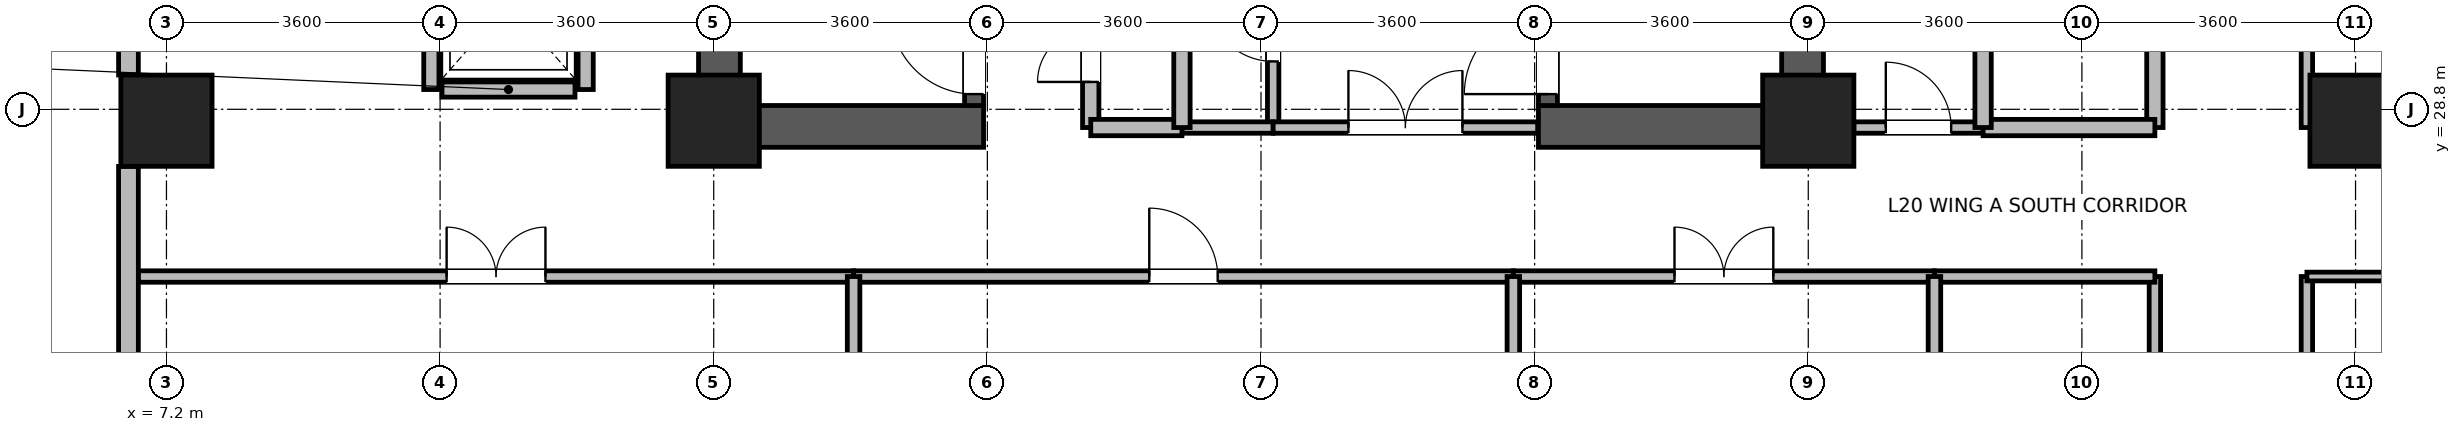
"""IFC4 building model, lengths in metres.
Left out: names, types, materials, properties, quantities, classifications, styles, units other than length and angle.
Written with IfcOpenShell. Run it as: python <this file> out.ifc"""

import sys

from ifc_helpers import new_model, si_unit, direction, frame, frame_2d, origin, origin_2d, place, context, subcontext, project, spatial, rectangle, extrude, source, transform, mapped, element, fill, save


model = new_model("IFC4")
c1 = context("Model", 3, precision=1e-05, world=origin(), true_north=direction((0.0, 1.0)))
c2 = subcontext(c1, "Body", "Model", "MODEL_VIEW")
j1 = project(units=[si_unit("LENGTHUNIT", "METRE"), si_unit("PLANEANGLEUNIT", "RADIAN")], contexts=[c1])
p1 = place(None, origin())
s1 = spatial("IfcSite", under=j1, at=p1, CompositionType="ELEMENT")
p2 = place(p1, origin())
s2 = spatial("IfcBuilding", under=s1, at=p2, CompositionType="ELEMENT")
p3 = place(p2, frame((0.0, 0.0, 82.3)))
s3 = spatial("IfcBuildingStorey", under=s2, at=p3, CompositionType="ELEMENT", Elevation=82.3)
for number, where, z_axis, x_axis in (
    (1, (14.475, 28.3, 0.0), (0.0, 0.0, 1.0), (0.0, 1.0, 0.0)),
    (2, (28.725, 28.3, 0.0), (0.0, 0.0, 1.0), (0.0, 1.0, 0.0)),
):
    element("IfcWall", number, at=place(p3, frame(where, z_axis=z_axis, x_axis=x_axis)), inside=s3, PredefinedType="SHEAR", context=c2, shape_type="SweptSolid", body=[
        extrude(rectangle(XDim=8.1, YDim=0.55, at=frame_2d((4.05, 0.0))), origin(), (0.0, 0.0, 1.0), 3.45),
    ])
for number, where, z_axis, x_axis in (
    (3, (14.75, 28.575, 0.0), (0.0, 0.0, 1.0), (1.0, 0.0, 0.0)),
    (4, (25.25, 28.575, 0.0), (0.0, 0.0, 1.0), (1.0, 0.0, 0.0)),
):
    element("IfcWall", number, at=place(p3, frame(where, z_axis=z_axis, x_axis=x_axis)), inside=s3, PredefinedType="SHEAR", context=c2, shape_type="SweptSolid", body=[
        extrude(rectangle(XDim=3.2, YDim=0.55, at=frame_2d((1.6, 0.0))), origin(), (0.0, 0.0, 1.0), 3.45),
    ])
p4 = place(p3, frame((17.825, 28.85, 0.0), z_axis=(0.0, 0.0, 1.0), x_axis=(0.0, 1.0, 0.0)))
e5 = element("IfcWall", 5, at=p4, inside=s3, PredefinedType="SHEAR", context=c2, shape_type="SweptSolid", body=[
    extrude(rectangle(XDim=7.0, YDim=0.25, at=frame_2d((3.5, 0.0))), origin(), (0.0, 0.0, 1.0), 3.45),
])
p5 = place(p4, frame((0.15, 0.0, 0.0)))
e6 = element("IfcOpeningElement", 6, at=p5, cuts=e5, PredefinedType="OPENING", context=c2, shape_type="SweptSolid", body=[
    extrude(rectangle(XDim=1.1, YDim=2.08, at=frame_2d((0.55, 1.04))), frame((0.0, 0.135, 0.0), z_axis=(0.0, -1.0, 0.0), x_axis=(1.0, 0.0, 0.0)), (0.0, 0.0, 1.0), 0.27),
])
p6 = place(p3, frame((25.375, 28.85, 0.0), z_axis=(0.0, 0.0, 1.0), x_axis=(0.0, 1.0, 0.0)))
e7 = element("IfcWall", 7, at=p6, inside=s3, PredefinedType="SHEAR", context=c2, shape_type="SweptSolid", body=[
    extrude(rectangle(XDim=7.0, YDim=0.25, at=frame_2d((3.5, 0.0))), origin(), (0.0, 0.0, 1.0), 3.45),
])
p7 = place(p6, frame((0.15, 0.0, 0.0)))
e8 = element("IfcOpeningElement", 8, at=p7, cuts=e7, PredefinedType="OPENING", context=c2, shape_type="SweptSolid", body=[
    extrude(rectangle(XDim=1.1, YDim=2.08, at=frame_2d((0.55, 1.04))), frame((0.0, 0.135, 0.0), z_axis=(0.0, -1.0, 0.0), x_axis=(1.0, 0.0, 0.0)), (0.0, 0.0, 1.0), 0.27),
])
m1 = source(origin(), c2, "Body", "SweptSolid", [
    extrude(rectangle(XDim=1.2, YDim=1.2, at=origin_2d()), origin(), (0.0, 0.0, 1.0), 3.7),
])
for number, where, z_axis, x_axis in (
    (9, (7.2, 28.65, 0.0), (0.0, 0.0, 1.0), (1.0, 0.0, 0.0)),
    (10, (14.4, 28.65, 0.0), (0.0, 0.0, 1.0), (1.0, 0.0, 0.0)),
    (11, (28.8, 28.65, 0.0), (0.0, 0.0, 1.0), (1.0, 0.0, 0.0)),
    (12, (36.0, 28.65, 0.0), (0.0, 0.0, 1.0), (1.0, 0.0, 0.0)),
):
    element("IfcColumn", number, at=place(p3, frame(where, z_axis=z_axis, x_axis=x_axis)), inside=s3, PredefinedType="COLUMN", context=c2, shape_type="MappedRepresentation", body=[
        mapped(m1, transform((0.0, 0.0, 0.0), x_axis=(1.0, 0.0, 0.0), y_axis=(0.0, 1.0, 0.0), z_axis=(0.0, 0.0, 1.0), scale=1.0)),
    ])
p8 = place(p3, frame((6.7, 29.251, 0.0), z_axis=(0.0, 0.0, 1.0), x_axis=(0.0, 1.0, 0.0)))
e13 = element("IfcWall", 13, at=p8, inside=s3, PredefinedType="STANDARD", context=c2, shape_type="SweptSolid", body=[
    extrude(rectangle(XDim=6.298, YDim=0.26, at=frame_2d((3.149, 0.0))), origin(), (0.0, 0.0, 1.0), 3.43),
])
p9 = place(p8, frame((2.674, 0.0, 0.85)))
e14 = element("IfcOpeningElement", 14, at=p9, cuts=e13, PredefinedType="OPENING", context=c2, shape_type="SweptSolid", body=[
    extrude(rectangle(XDim=0.95, YDim=1.75, at=frame_2d((0.475, 0.875))), frame((0.0, 0.14, 0.0), z_axis=(0.0, -1.0, 0.0), x_axis=(1.0, 0.0, 0.0)), (0.0, 0.0, 1.0), 0.28),
])
p10 = place(p8, frame((1.112, 0.0, 0.85)))
e15 = element("IfcOpeningElement", 15, at=p10, cuts=e13, PredefinedType="OPENING", context=c2, shape_type="SweptSolid", body=[
    extrude(rectangle(XDim=0.95, YDim=1.75, at=frame_2d((0.475, 0.875))), frame((0.0, 0.14, 0.0), z_axis=(0.0, -1.0, 0.0), x_axis=(1.0, 0.0, 0.0)), (0.0, 0.0, 1.0), 0.28),
])
p11 = place(p3, frame((6.7, 21.47, 0.0), z_axis=(0.0, 0.0, 1.0), x_axis=(0.0, 1.0, 0.0)))
e16 = element("IfcWall", 16, at=p11, inside=s3, PredefinedType="STANDARD", context=c2, shape_type="SweptSolid", body=[
    extrude(rectangle(XDim=6.579, YDim=0.26, at=frame_2d((3.29, 0.0))), origin(), (0.0, 0.0, 1.0), 3.43),
])
p12 = place(p11, frame((2.814, 0.0, 0.85)))
e17 = element("IfcOpeningElement", 17, at=p12, cuts=e16, PredefinedType="OPENING", context=c2, shape_type="SweptSolid", body=[
    extrude(rectangle(XDim=0.95, YDim=1.75, at=frame_2d((0.475, 0.875))), frame((0.0, 0.14, 0.0), z_axis=(0.0, -1.0, 0.0), x_axis=(1.0, 0.0, 0.0)), (0.0, 0.0, 1.0), 0.28),
])
p13 = place(p11, frame((1.183, 0.0, 0.85)))
e18 = element("IfcOpeningElement", 18, at=p13, cuts=e16, PredefinedType="OPENING", context=c2, shape_type="SweptSolid", body=[
    extrude(rectangle(XDim=0.95, YDim=1.75, at=frame_2d((0.475, 0.875))), frame((0.0, 0.14, 0.0), z_axis=(0.0, -1.0, 0.0), x_axis=(1.0, 0.0, 0.0)), (0.0, 0.0, 1.0), 0.28),
])
p14 = place(p3, frame((10.825, 29.06, 0.0), z_axis=(0.0, 0.0, 1.0), x_axis=(1.0, 0.0, 0.0)))
e19 = element("IfcWall", 19, at=p14, inside=s3, PredefinedType="PARTITIONING", context=c2, shape_type="SweptSolid", body=[
    extrude(rectangle(XDim=1.75, YDim=0.2, at=frame_2d((0.875, 0.0))), origin(), (0.0, 0.0, 1.0), 3.43),
])
for number, where, z_axis, x_axis in (
    (20, (10.685, 29.06, 0.0), (0.0, 0.0, 1.0), (0.0, 1.0, 0.0)),
    (21, (12.715, 29.06, 0.0), (0.0, 0.0, 1.0), (0.0, 1.0, 0.0)),
):
    element("IfcWall", number, at=place(p3, frame(where, z_axis=z_axis, x_axis=x_axis)), inside=s3, PredefinedType="PARTITIONING", context=c2, shape_type="SweptSolid", body=[
        extrude(rectangle(XDim=2.28, YDim=0.2, at=frame_2d((1.14, 0.0))), origin(), (0.0, 0.0, 1.0), 3.43),
    ])
p15 = place(p3, frame((35.36, 16.96, 0.0), z_axis=(0.0, 0.0, 1.0), x_axis=(0.0, 1.0, 0.0)))
e22 = element("IfcWall", 22, at=p15, inside=s3, PredefinedType="PARTITIONING", context=c2, shape_type="SweptSolid", body=[
    extrude(rectangle(XDim=9.64, YDim=0.15, at=frame_2d((4.82, 0.0))), origin(), (0.0, 0.0, 1.0), 3.43),
])
p16 = place(p15, frame((2.435, 0.0, 0.0)))
e23 = element("IfcOpeningElement", 23, at=p16, cuts=e22, PredefinedType="OPENING", context=c2, shape_type="SweptSolid", body=[
    extrude(rectangle(XDim=1.3, YDim=2.12, at=frame_2d((0.65, 1.06))), frame((0.0, 0.085, 0.0), z_axis=(0.0, -1.0, 0.0), x_axis=(1.0, 0.0, 0.0)), (0.0, 0.0, 1.0), 0.17),
])
p17 = place(p3, frame((6.832, 26.6, 0.0), z_axis=(0.0, 0.0, 1.0), x_axis=(1.0, 0.0, 0.0)))
e24 = element("IfcWall", 24, at=p17, inside=s3, PredefinedType="PARTITIONING", context=c2, shape_type="SweptSolid", body=[
    extrude(rectangle(XDim=9.408, YDim=0.15, at=frame_2d((4.704, 0.0))), origin(), (0.0, 0.0, 1.0), 3.43),
])
p18 = place(p17, frame((4.054, 0.0, 0.0)))
e25 = element("IfcOpeningElement", 25, at=p18, cuts=e24, PredefinedType="OPENING", context=c2, shape_type="SweptSolid", body=[
    extrude(rectangle(XDim=1.3, YDim=2.12, at=frame_2d((0.65, 1.06))), frame((0.0, 0.085, 0.0), z_axis=(0.0, -1.0, 0.0), x_axis=(1.0, 0.0, 0.0)), (0.0, 0.0, 1.0), 0.17),
])
p19 = place(p3, frame((16.24, 26.6, 0.0), z_axis=(0.0, 0.0, 1.0), x_axis=(1.0, 0.0, 0.0)))
e26 = element("IfcWall", 26, at=p19, inside=s3, PredefinedType="PARTITIONING", context=c2, shape_type="SweptSolid", body=[
    extrude(rectangle(XDim=8.68, YDim=0.15, at=frame_2d((4.34, 0.0))), origin(), (0.0, 0.0, 1.0), 3.43),
])
p20 = place(p19, frame((3.89, 0.0, 0.0)))
e27 = element("IfcOpeningElement", 27, at=p20, cuts=e26, PredefinedType="OPENING", context=c2, shape_type="SweptSolid", body=[
    extrude(rectangle(XDim=0.9, YDim=2.08, at=frame_2d((0.45, 1.04))), frame((0.0, 0.085, 0.0), z_axis=(0.0, -1.0, 0.0), x_axis=(1.0, 0.0, 0.0)), (0.0, 0.0, 1.0), 0.17),
])
p21 = place(p3, frame((35.36, 28.56, 0.0), z_axis=(0.0, 0.0, 1.0), x_axis=(0.0, 1.0, 0.0)))
e28 = element("IfcWall", 28, at=p21, inside=s3, PredefinedType="PARTITIONING", context=c2, shape_type="SweptSolid", body=[
    extrude(rectangle(XDim=7.68, YDim=0.15, at=frame_2d((3.84, 0.0))), origin(), (0.0, 0.0, 1.0), 3.43),
])
p22 = place(p21, frame((3.19, 0.0, 0.0)))
e29 = element("IfcOpeningElement", 29, at=p22, cuts=e28, PredefinedType="OPENING", context=c2, shape_type="SweptSolid", body=[
    extrude(rectangle(XDim=1.3, YDim=2.12, at=frame_2d((0.65, 1.06))), frame((0.0, 0.085, 0.0), z_axis=(0.0, -1.0, 0.0), x_axis=(1.0, 0.0, 0.0)), (0.0, 0.0, 1.0), 0.17),
])
p23 = place(p3, frame((24.92, 26.6, 0.0), z_axis=(0.0, 0.0, 1.0), x_axis=(1.0, 0.0, 0.0)))
e30 = element("IfcWall", 30, at=p23, inside=s3, PredefinedType="PARTITIONING", context=c2, shape_type="SweptSolid", body=[
    extrude(rectangle(XDim=5.54, YDim=0.15, at=frame_2d((2.77, 0.0))), origin(), (0.0, 0.0, 1.0), 3.43),
])
p24 = place(p23, frame((2.12, 0.0, 0.0)))
e31 = element("IfcOpeningElement", 31, at=p24, cuts=e30, PredefinedType="OPENING", context=c2, shape_type="SweptSolid", body=[
    extrude(rectangle(XDim=1.3, YDim=2.12, at=frame_2d((0.65, 1.06))), frame((0.0, 0.085, 0.0), z_axis=(0.0, -1.0, 0.0), x_axis=(1.0, 0.0, 0.0)), (0.0, 0.0, 1.0), 0.17),
])
p25 = place(p3, frame((33.36, 21.6, 0.0), z_axis=(0.0, 0.0, 1.0), x_axis=(0.0, 1.0, 0.0)))
e32 = element("IfcWall", 32, at=p25, inside=s3, PredefinedType="PARTITIONING", context=c2, shape_type="SweptSolid", body=[
    extrude(rectangle(XDim=5.0, YDim=0.15, at=frame_2d((2.5, 0.0))), origin(), (0.0, 0.0, 1.0), 3.43),
])
p26 = place(p25, frame((2.07, 0.0, 0.0)))
e33 = element("IfcOpeningElement", 33, at=p26, cuts=e32, PredefinedType="OPENING", context=c2, shape_type="SweptSolid", body=[
    extrude(rectangle(XDim=0.86, YDim=2.02, at=frame_2d((0.43, 1.01))), frame((0.0, 0.085, 0.0), z_axis=(0.0, -1.0, 0.0), x_axis=(1.0, 0.0, 0.0)), (0.0, 0.0, 1.0), 0.17),
])
p27 = place(p3, frame((33.36, 28.56, 0.0), z_axis=(0.0, 0.0, 1.0), x_axis=(0.0, 1.0, 0.0)))
e34 = element("IfcWall", 34, at=p27, inside=s3, PredefinedType="PARTITIONING", context=c2, shape_type="SweptSolid", body=[
    extrude(rectangle(XDim=3.84, YDim=0.215, at=frame_2d((1.92, 0.0))), origin(), (0.0, 0.0, 1.0), 3.43),
])
p28 = place(p27, frame((1.22, 0.0, 0.0)))
e35 = element("IfcOpeningElement", 35, at=p28, cuts=e34, PredefinedType="OPENING", context=c2, shape_type="SweptSolid", body=[
    extrude(rectangle(XDim=1.4, YDim=2.15, at=frame_2d((0.7, 1.075))), frame((0.0, 0.118, 0.0), z_axis=(0.0, -1.0, 0.0), x_axis=(1.0, 0.0, 0.0)), (0.0, 0.0, 1.0), 0.235),
])
p29 = place(p3, frame((30.46, 26.6, 0.0), z_axis=(0.0, 0.0, 1.0), x_axis=(1.0, 0.0, 0.0)))
e36 = element("IfcWall", 36, at=p29, inside=s3, PredefinedType="PARTITIONING", context=c2, shape_type="SweptSolid", body=[
    extrude(rectangle(XDim=2.9, YDim=0.15, at=frame_2d((1.45, 0.0))), origin(), (0.0, 0.0, 1.0), 3.43),
])
p30 = place(p3, frame((19.36, 28.56, 0.0), z_axis=(0.0, 0.0, 1.0), x_axis=(0.0, 1.0, 0.0)))
e37 = element("IfcWall", 37, at=p30, inside=s3, PredefinedType="PARTITIONING", context=c2, shape_type="SweptSolid", body=[
    extrude(rectangle(XDim=2.6, YDim=0.215, at=frame_2d((1.3, 0.0))), origin(), (0.0, 0.0, 1.0), 3.43),
])
p31 = place(p30, frame((0.6, 0.0, 0.0)))
e38 = element("IfcOpeningElement", 38, at=p31, cuts=e37, PredefinedType="OPENING", context=c2, shape_type="SweptSolid", body=[
    extrude(rectangle(XDim=1.4, YDim=2.15, at=frame_2d((0.7, 1.075))), frame((0.0, 0.118, 0.0), z_axis=(0.0, -1.0, 0.0), x_axis=(1.0, 0.0, 0.0)), (0.0, 0.0, 1.0), 0.235),
])
p32 = place(p3, frame((21.76, 28.56, 0.0), z_axis=(0.0, 0.0, 1.0), x_axis=(0.0, 1.0, 0.0)))
e39 = element("IfcWall", 39, at=p32, inside=s3, PredefinedType="PARTITIONING", context=c2, shape_type="SweptSolid", body=[
    extrude(rectangle(XDim=2.6, YDim=0.15, at=frame_2d((1.3, 0.0))), origin(), (0.0, 0.0, 1.0), 3.43),
])
p33 = place(p32, frame((0.87, 0.0, 0.0)))
e40 = element("IfcOpeningElement", 40, at=p33, cuts=e39, PredefinedType="OPENING", context=c2, shape_type="SweptSolid", body=[
    extrude(rectangle(XDim=0.86, YDim=2.02, at=frame_2d((0.43, 1.01))), frame((0.0, 0.085, 0.0), z_axis=(0.0, -1.0, 0.0), x_axis=(1.0, 0.0, 0.0)), (0.0, 0.0, 1.0), 0.17),
])
p34 = place(p3, frame((29.4, 28.56, 0.0), z_axis=(0.0, 0.0, 1.0), x_axis=(1.0, 0.0, 0.0)))
e41 = element("IfcWall", 41, at=p34, inside=s3, PredefinedType="PARTITIONING", context=c2, shape_type="SweptSolid", body=[
    extrude(rectangle(XDim=1.7, YDim=0.15, at=frame_2d((0.85, 0.0))), origin(), (0.0, 0.0, 1.0), 2.78),
])
p35 = place(p34, frame((0.42, 0.0, 0.0)))
e42 = element("IfcOpeningElement", 42, at=p35, cuts=e41, PredefinedType="OPENING", context=c2, shape_type="SweptSolid", body=[
    extrude(rectangle(XDim=0.86, YDim=2.02, at=frame_2d((0.43, 1.01))), frame((0.0, 0.085, 0.0), z_axis=(0.0, -1.0, 0.0), x_axis=(1.0, 0.0, 0.0)), (0.0, 0.0, 1.0), 0.17),
])
p36 = place(p3, frame((31.1, 28.56, 0.0), z_axis=(0.0, 0.0, 1.0), x_axis=(1.0, 0.0, 0.0)))
e43 = element("IfcWall", 43, at=p36, inside=s3, PredefinedType="PARTITIONING", context=c2, shape_type="SweptSolid", body=[
    extrude(rectangle(XDim=2.26, YDim=0.215, at=frame_2d((1.13, 0.0))), origin(), (0.0, 0.0, 1.0), 2.78),
])
p37 = place(p3, frame((20.56, 28.56, 0.0), z_axis=(0.0, 0.0, 1.0), x_axis=(1.0, 0.0, 0.0)))
e44 = element("IfcWall", 44, at=p37, inside=s3, PredefinedType="PARTITIONING", context=c2, shape_type="SweptSolid", body=[
    extrude(rectangle(XDim=1.2, YDim=0.15, at=frame_2d((0.6, 0.0))), origin(), (0.0, 0.0, 1.0), 2.23),
])
p38 = place(p3, frame((19.36, 28.56, 0.0), z_axis=(0.0, 0.0, 1.0), x_axis=(1.0, 0.0, 0.0)))
e45 = element("IfcWall", 45, at=p38, inside=s3, PredefinedType="PARTITIONING", context=c2, shape_type="SweptSolid", body=[
    extrude(rectangle(XDim=1.2, YDim=0.215, at=frame_2d((0.6, 0.0))), origin(), (0.0, 0.0, 1.0), 2.23),
])
p39 = place(p3, frame((35.36, 26.6, 0.0), z_axis=(0.0, 0.0, 1.0), x_axis=(1.0, 0.0, 0.0)))
e46 = element("IfcWall", 46, at=p39, inside=s3, PredefinedType="PARTITIONING", context=c2, shape_type="SweptSolid", body=[
    extrude(rectangle(XDim=7.24, YDim=0.115, at=frame_2d((3.62, 0.0))), origin(), (0.0, 0.0, 1.0), 3.43),
])
for number, where, z_axis, x_axis in (
    (47, (16.24, 21.62, 0.0), (0.0, 0.0, 1.0), (0.0, 1.0, 0.0)),
    (48, (24.92, 21.62, 0.0), (0.0, 0.0, 1.0), (0.0, 1.0, 0.0)),
    (49, (30.46, 21.62, 0.0), (0.0, 0.0, 1.0), (0.0, 1.0, 0.0)),
):
    element("IfcWall", number, at=place(p3, frame(where, z_axis=z_axis, x_axis=x_axis)), inside=s3, PredefinedType="PARTITIONING", context=c2, shape_type="SweptSolid", body=[
        extrude(rectangle(XDim=4.98, YDim=0.165, at=frame_2d((2.49, 0.0))), origin(), (0.0, 0.0, 1.0), 3.43),
    ])
p40 = place(p3, frame((31.1, 28.56, 0.0), z_axis=(0.0, 0.0, 1.0), x_axis=(0.0, 1.0, 0.0)))
e50 = element("IfcWall", 50, at=p40, inside=s3, PredefinedType="PARTITIONING", context=c2, shape_type="SweptSolid", body=[
    extrude(rectangle(XDim=3.84, YDim=0.215, at=frame_2d((1.92, 0.0))), origin(), (0.0, 0.0, 1.0), 3.43),
])
p41 = place(p3, frame((21.76, 28.56, 0.0), z_axis=(0.0, 0.0, 1.0), x_axis=(1.0, 0.0, 0.0)))
e51 = element("IfcWall", 51, at=p41, inside=s3, PredefinedType="PARTITIONING", context=c2, shape_type="SweptSolid", body=[
    extrude(rectangle(XDim=3.48, YDim=0.15, at=frame_2d((1.74, 0.0))), origin(), (0.0, 0.0, 1.0), 2.23),
])
p42 = place(p41, frame((0.99, 0.0, 0.0)))
e52 = element("IfcOpeningElement", 52, at=p42, cuts=e51, PredefinedType="OPENING", context=c2, shape_type="SweptSolid", body=[
    extrude(rectangle(XDim=1.5, YDim=2.1, at=frame_2d((0.75, 1.05))), frame((0.0, 0.085, 0.0), z_axis=(0.0, -1.0, 0.0), x_axis=(1.0, 0.0, 0.0)), (0.0, 0.0, 1.0), 0.17),
])
p43 = place(p3, frame((20.56, 28.56, 0.0), z_axis=(0.0, 0.0, 1.0), x_axis=(0.0, 1.0, 0.0)))
e53 = element("IfcWall", 53, at=p43, inside=s3, PredefinedType="PARTITIONING", context=c2, shape_type="SweptSolid", body=[
    extrude(rectangle(XDim=2.6, YDim=0.215, at=frame_2d((1.3, 0.0))), origin(), (0.0, 0.0, 1.0), 3.43),
])
p44 = place(p5, origin())
e54 = element("IfcDoor", 54, at=p44, inside=s3, OperationType="SINGLE_SWING_RIGHT", PredefinedType="DOOR", context=c2, shape_type="SweptSolid", body=[
    extrude(rectangle(XDim=1.1, YDim=2.08, at=frame_2d((0.55, 1.04))), frame((0.0, 0.025, 0.0), z_axis=(0.0, -1.0, 0.0), x_axis=(1.0, 0.0, 0.0)), (0.0, 0.0, 1.0), 0.05),
])
fill(e6, e54)
p45 = place(p7, origin())
e55 = element("IfcDoor", 55, at=p45, inside=s3, OperationType="SINGLE_SWING_LEFT", PredefinedType="DOOR", context=c2, shape_type="SweptSolid", body=[
    extrude(rectangle(XDim=1.1, YDim=2.08, at=frame_2d((0.55, 1.04))), frame((0.0, 0.025, 0.0), z_axis=(0.0, -1.0, 0.0), x_axis=(1.0, 0.0, 0.0)), (0.0, 0.0, 1.0), 0.05),
])
fill(e8, e55)
p46 = place(p18, origin())
e56 = element("IfcDoor", 56, at=p46, inside=s3, OperationType="DOUBLE_DOOR_SINGLE_SWING", PredefinedType="DOOR", context=c2, shape_type="SweptSolid", body=[
    extrude(rectangle(XDim=1.3, YDim=2.12, at=frame_2d((0.65, 1.06))), frame((0.0, 0.025, 0.0), z_axis=(0.0, -1.0, 0.0), x_axis=(1.0, 0.0, 0.0)), (0.0, 0.0, 1.0), 0.05),
])
fill(e25, e56)
p47 = place(p20, origin())
e57 = element("IfcDoor", 57, at=p47, inside=s3, OperationType="SINGLE_SWING_LEFT", PredefinedType="DOOR", context=c2, shape_type="SweptSolid", body=[
    extrude(rectangle(XDim=0.9, YDim=2.08, at=frame_2d((0.45, 1.04))), frame((0.0, 0.025, 0.0), z_axis=(0.0, -1.0, 0.0), x_axis=(1.0, 0.0, 0.0)), (0.0, 0.0, 1.0), 0.05),
])
fill(e27, e57)
p48 = place(p24, origin())
e58 = element("IfcDoor", 58, at=p48, inside=s3, OperationType="DOUBLE_DOOR_SINGLE_SWING", PredefinedType="DOOR", context=c2, shape_type="SweptSolid", body=[
    extrude(rectangle(XDim=1.3, YDim=2.12, at=frame_2d((0.65, 1.06))), frame((0.0, 0.025, 0.0), z_axis=(0.0, -1.0, 0.0), x_axis=(1.0, 0.0, 0.0)), (0.0, 0.0, 1.0), 0.05),
])
fill(e31, e58)
p49 = place(p31, origin())
e59 = element("IfcDoor", 59, at=p49, inside=s3, OperationType="DOUBLE_DOOR_SINGLE_SWING", PredefinedType="DOOR", context=c2, shape_type="SweptSolid", body=[
    extrude(rectangle(XDim=1.4, YDim=2.15, at=frame_2d((0.7, 1.075))), frame((0.0, 0.025, 0.0), z_axis=(0.0, -1.0, 0.0), x_axis=(1.0, 0.0, 0.0)), (0.0, 0.0, 1.0), 0.05),
])
fill(e38, e59)
p50 = place(p33, origin())
e60 = element("IfcDoor", 60, at=p50, inside=s3, OperationType="SINGLE_SWING_RIGHT", PredefinedType="DOOR", context=c2, shape_type="SweptSolid", body=[
    extrude(rectangle(XDim=0.86, YDim=2.02, at=frame_2d((0.43, 1.01))), frame((0.0, 0.025, 0.0), z_axis=(0.0, -1.0, 0.0), x_axis=(1.0, 0.0, 0.0)), (0.0, 0.0, 1.0), 0.05),
])
fill(e40, e60)
p51 = place(p35, origin())
e61 = element("IfcDoor", 61, at=p51, inside=s3, OperationType="SINGLE_SWING_LEFT", PredefinedType="DOOR", context=c2, shape_type="SweptSolid", body=[
    extrude(rectangle(XDim=0.86, YDim=2.02, at=frame_2d((0.43, 1.01))), frame((0.0, 0.025, 0.0), z_axis=(0.0, -1.0, 0.0), x_axis=(1.0, 0.0, 0.0)), (0.0, 0.0, 1.0), 0.05),
])
fill(e42, e61)
p52 = place(p42, origin())
e62 = element("IfcDoor", 62, at=p52, inside=s3, OperationType="DOUBLE_DOOR_SINGLE_SWING", PredefinedType="DOOR", context=c2, shape_type="SweptSolid", body=[
    extrude(rectangle(XDim=1.5, YDim=2.1, at=frame_2d((0.75, 1.05))), frame((0.0, 0.025, 0.0), z_axis=(0.0, -1.0, 0.0), x_axis=(1.0, 0.0, 0.0)), (0.0, 0.0, 1.0), 0.05),
])
fill(e52, e62)
save(model, sys.argv[1])
